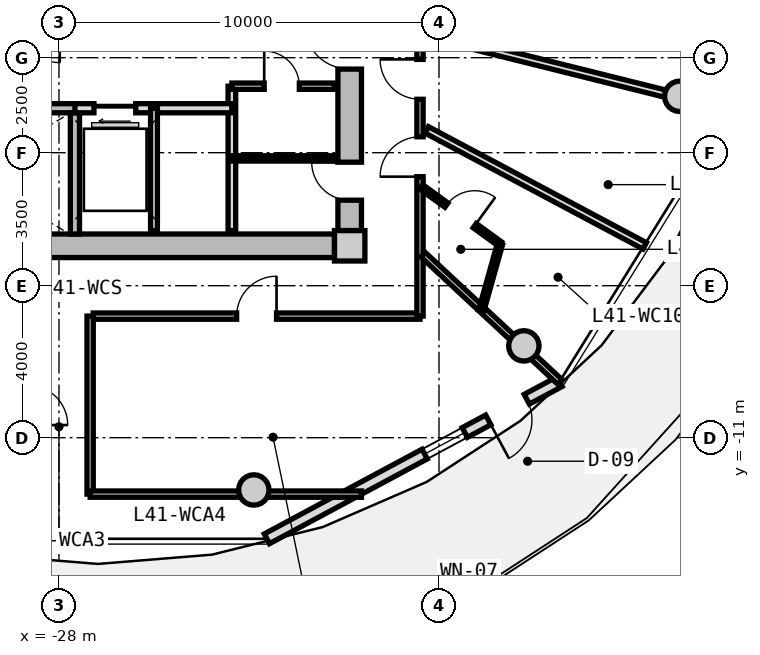
"""IFC4 building model, lengths in metres.
Left out: names, types, materials, properties, quantities, classifications, styles, units other than length and angle.
Written with IfcOpenShell. Run it as: python <this file> out.ifc"""

import sys

from ifc_helpers import new_model, si_unit, direction, frame, frame_2d, origin, origin_2d, place, context, subcontext, project, spatial, rectangle, circle, extrude, source, transform, mapped, element, fill, save


model = new_model("IFC4")
c1 = context("Model", 3, precision=1e-05, world=origin(), true_north=direction((0.0, 1.0)))
c2 = subcontext(c1, "Body", "Model", "MODEL_VIEW")
j1 = project(units=[si_unit("LENGTHUNIT", "METRE"), si_unit("PLANEANGLEUNIT", "RADIAN")], contexts=[c1])
p1 = place(None, origin())
s1 = spatial("IfcSite", under=j1, at=p1, CompositionType="ELEMENT")
p2 = place(p1, origin())
s2 = spatial("IfcBuilding", under=s1, at=p2, CompositionType="ELEMENT")
p3 = place(p2, frame((0.0, 0.0, 134.3)))
s3 = spatial("IfcBuildingStorey", under=s2, at=p3, CompositionType="ELEMENT", Elevation=134.3)
m1 = source(origin(), c2, "Body", "SweptSolid", [
    extrude(rectangle(XDim=0.8, YDim=0.8, at=origin_2d()), origin(), (0.0, 0.0, 1.0), 3.05),
])
p4 = place(p3, frame((-20.35, -5.95, 0.0), z_axis=(0.0, 0.0, 1.0), x_axis=(1.0, 0.0, 0.0)))
e1 = element("IfcColumn", 1, at=p4, inside=s3, PredefinedType="COLUMN", context=c2, shape_type="MappedRepresentation", body=[
    mapped(m1, transform((0.0, 0.0, 0.0), x_axis=(1.0, 0.0, 0.0), y_axis=(0.0, 1.0, 0.0), z_axis=(0.0, 0.0, 1.0), scale=1.0)),
])
m2 = source(origin(), c2, "Body", "SweptSolid", [
    extrude(rectangle(XDim=14.5, YDim=0.62, at=frame_2d((7.25, 0.0))), origin(), (0.0, 0.0, 1.0), 2.81),
])
p5 = place(p3, frame((-20.75, -5.95, 0.0), z_axis=(0.0, 0.0, 1.0), x_axis=(-1.0, 0.0, 0.0)))
e2 = element("IfcWall", 2, at=p5, inside=s3, PredefinedType="SHEAR", context=c2, shape_type="MappedRepresentation", body=[
    mapped(m2, transform((0.0, 0.0, 0.0), x_axis=(1.0, 0.0, 0.0), y_axis=(0.0, 1.0, 0.0), z_axis=(0.0, 0.0, 1.0), scale=1.0)),
])
m3 = source(origin(), c2, "Body", "SweptSolid", [
    extrude(rectangle(XDim=11.1, YDim=0.62, at=frame_2d((5.55, 0.0))), origin(), (0.0, 0.0, 1.0), 2.81),
])
p6 = place(p3, frame((-20.35, 5.55, 0.0), z_axis=(0.0, 0.0, 1.0), x_axis=(0.0, -1.0, 0.0)))
e3 = element("IfcWall", 3, at=p6, inside=s3, PredefinedType="SHEAR", context=c2, shape_type="MappedRepresentation", body=[
    mapped(m3, transform((0.0, 0.0, 0.0), x_axis=(1.0, 0.0, 0.0), y_axis=(0.0, 1.0, 0.0), z_axis=(0.0, 0.0, 1.0), scale=1.0)),
])
p7 = place(p6, frame((5.65, 0.0, 0.0)))
e4 = element("IfcOpeningElement", 4, at=p7, cuts=e3, PredefinedType="OPENING", context=c2, shape_type="SweptSolid", body=[
    extrude(rectangle(XDim=1.2, YDim=2.15, at=frame_2d((0.6, 1.075))), frame((0.0, 0.32, 0.0), z_axis=(0.0, -1.0, 0.0), x_axis=(1.0, 0.0, 0.0)), (0.0, 0.0, 1.0), 0.64),
])
p8 = place(p6, frame((9.3, 0.0, 0.0)))
e5 = element("IfcOpeningElement", 5, at=p8, cuts=e3, PredefinedType="OPENING", context=c2, shape_type="SweptSolid", body=[
    extrude(rectangle(XDim=1.0, YDim=2.1, at=frame_2d((0.5, 1.05))), frame((0.0, 0.32, 0.0), z_axis=(0.0, -1.0, 0.0), x_axis=(1.0, 0.0, 0.0)), (0.0, 0.0, 1.0), 0.64),
])
m4 = source(origin(), c2, "Body", "SweptSolid", [
    extrude(circle(Radius=0.4, at=origin_2d()), origin(), (0.0, 0.0, 1.0), 3.47),
])
for number, where, z_axis, x_axis in (
    (6, (-22.873, -12.375, -0.42), (0.0, 0.0, 1.0), (1.0, 0.0, 0.0)),
    (7, (-15.767, -8.584, -0.42), (0.0, 0.0, 1.0), (1.0, 0.0, 0.0)),
    (8, (-11.665, -2.016, -0.42), (0.0, 0.0, 1.0), (1.0, 0.0, 0.0)),
):
    element("IfcColumn", number, at=place(p3, frame(where, z_axis=z_axis, x_axis=x_axis)), inside=s3, PredefinedType="COLUMN", context=c2, shape_type="MappedRepresentation", body=[
        mapped(m4, transform((0.0, 0.0, 0.0), x_axis=(1.0, 0.0, 0.0), y_axis=(0.0, 1.0, 0.0), z_axis=(0.0, 0.0, 1.0), scale=1.0)),
    ])
m5 = source(origin(), c2, "Body", "SweptSolid", [
    extrude(rectangle(XDim=8.742, YDim=0.29, at=frame_2d((4.371, 0.0))), origin(), (0.0, 0.0, 1.0), 2.81),
])
p9 = place(p3, frame((-14.827, -9.524, 0.0), z_axis=(0.0, 0.0, 1.0), x_axis=(-0.880998740657, -0.473118609823, 0.0)))
e9 = element("IfcWall", 9, at=p9, inside=s3, PredefinedType="SOLIDWALL", context=c2, shape_type="MappedRepresentation", body=[
    mapped(m5, transform((0.0, 0.0, 0.0), x_axis=(1.0, 0.0, 0.0), y_axis=(0.0, 1.0, 0.0), z_axis=(0.0, 0.0, 1.0), scale=1.0)),
])
p10 = place(p9, frame((0.98, 0.0, 0.0)))
e10 = element("IfcOpeningElement", 10, at=p10, cuts=e9, PredefinedType="OPENING", context=c2, shape_type="SweptSolid", body=[
    extrude(rectangle(XDim=1.15, YDim=2.25, at=frame_2d((0.575, 1.125))), frame((0.0, 0.155, 0.0), z_axis=(0.0, -1.0, 0.0), x_axis=(1.0, 0.0, 0.0)), (0.0, 0.0, 1.0), 0.31),
])
p11 = place(p9, frame((2.83, 0.0, 0.85)))
e11 = element("IfcOpeningElement", 11, at=p11, cuts=e9, PredefinedType="OPENING", context=c2, shape_type="SweptSolid", body=[
    extrude(rectangle(XDim=1.2, YDim=1.5, at=frame_2d((0.6, 0.75))), frame((0.0, 0.155, 0.0), z_axis=(0.0, -1.0, 0.0), x_axis=(1.0, 0.0, 0.0)), (0.0, 0.0, 1.0), 0.31),
])
m6 = source(origin(), c2, "Body", "SweptSolid", [
    extrude(rectangle(XDim=7.88, YDim=0.24, at=frame_2d((3.94, 0.0))), origin(), (0.0, 0.0, 1.0), 2.81),
])
p12 = place(p3, frame((-35.34, -2.33, 0.0), z_axis=(0.0, 0.0, 1.0), x_axis=(1.0, 0.0, 0.0)))
e12 = element("IfcWall", 12, at=p12, inside=s3, PredefinedType="PARTITIONING", context=c2, shape_type="MappedRepresentation", body=[
    mapped(m6, transform((0.0, 0.0, 0.0), x_axis=(1.0, 0.0, 0.0), y_axis=(0.0, 1.0, 0.0), z_axis=(0.0, 0.0, 1.0), scale=1.0)),
])
p13 = place(p12, frame((1.0, 0.0, 0.0)))
e13 = element("IfcOpeningElement", 13, at=p13, cuts=e12, PredefinedType="OPENING", context=c2, shape_type="SweptSolid", body=[
    extrude(rectangle(XDim=1.1, YDim=2.15, at=frame_2d((0.55, 1.075))), frame((0.0, 0.13, 0.0), z_axis=(0.0, -1.0, 0.0), x_axis=(1.0, 0.0, 0.0)), (0.0, 0.0, 1.0), 0.26),
])
m7 = source(origin(), c2, "Body", "SweptSolid", [
    extrude(rectangle(XDim=3.19, YDim=0.24, at=frame_2d((1.595, 0.0))), origin(), (0.0, 0.0, 1.0), 2.81),
])
p14 = place(p3, frame((-27.58, -5.64, 0.0), z_axis=(0.0, 0.0, 1.0), x_axis=(0.0, 1.0, 0.0)))
e14 = element("IfcWall", 14, at=p14, inside=s3, PredefinedType="PARTITIONING", context=c2, shape_type="MappedRepresentation", body=[
    mapped(m7, transform((0.0, 0.0, 0.0), x_axis=(1.0, 0.0, 0.0), y_axis=(0.0, 1.0, 0.0), z_axis=(0.0, 0.0, 1.0), scale=1.0)),
])
m8 = source(origin(), c2, "Body", "SweptSolid", [
    extrude(rectangle(XDim=3.8, YDim=0.2, at=frame_2d((1.9, 0.0))), origin(), (0.0, 0.0, 1.0), 2.795),
])
p15 = place(p3, frame((-23.45, -5.55, 0.0), z_axis=(0.0, 0.0, 1.0), x_axis=(0.0, 1.0, 0.0)))
e15 = element("IfcWall", 15, at=p15, inside=s3, PredefinedType="PARTITIONING", context=c2, shape_type="MappedRepresentation", body=[
    mapped(m8, transform((0.0, 0.0, 0.0), x_axis=(1.0, 0.0, 0.0), y_axis=(0.0, 1.0, 0.0), z_axis=(0.0, 0.0, 1.0), scale=1.0)),
])
m9 = source(origin(), c2, "Body", "SweptSolid", [
    extrude(rectangle(XDim=4.13, YDim=0.24, at=frame_2d((2.065, 0.0))), origin(), (0.0, 0.0, 1.0), 2.795),
])
p16 = place(p3, frame((-27.58, -2.33, 0.0), z_axis=(0.0, 0.0, 1.0), x_axis=(1.0, 0.0, 0.0)))
e16 = element("IfcWall", 16, at=p16, inside=s3, PredefinedType="PARTITIONING", context=c2, shape_type="MappedRepresentation", body=[
    mapped(m9, transform((0.0, 0.0, 0.0), x_axis=(1.0, 0.0, 0.0), y_axis=(0.0, 1.0, 0.0), z_axis=(0.0, 0.0, 1.0), scale=1.0)),
])
p17 = place(p16, frame((0.5, 0.0, 0.0)))
e17 = element("IfcOpeningElement", 17, at=p17, cuts=e16, PredefinedType="OPENING", context=c2, shape_type="SweptSolid", body=[
    extrude(rectangle(XDim=1.1, YDim=2.2, at=frame_2d((0.55, 1.1))), frame((0.0, 0.13, 0.0), z_axis=(0.0, -1.0, 0.0), x_axis=(1.0, 0.0, 0.0)), (0.0, 0.0, 1.0), 0.26),
])
m10 = source(origin(), c2, "Body", "SweptSolid", [
    extrude(rectangle(XDim=3.22, YDim=0.18, at=frame_2d((1.61, 0.0))), origin(), (0.0, 0.0, 1.0), 2.795),
])
p18 = place(p3, frame((-25.5, -5.55, 0.0), z_axis=(0.0, 0.0, 1.0), x_axis=(0.0, 1.0, 0.0)))
e18 = element("IfcWall", 18, at=p18, inside=s3, PredefinedType="PARTITIONING", context=c2, shape_type="MappedRepresentation", body=[
    mapped(m10, transform((0.0, 0.0, 0.0), x_axis=(1.0, 0.0, 0.0), y_axis=(0.0, 1.0, 0.0), z_axis=(0.0, 0.0, 1.0), scale=1.0)),
])
m11 = source(origin(), c2, "Body", "SweptSolid", [
    extrude(rectangle(XDim=2.7, YDim=0.165, at=frame_2d((1.35, 0.0))), origin(), (0.0, 0.0, 1.0), 2.795),
])
p19 = place(p3, frame((-23.45, -1.75, 0.0), z_axis=(0.0, 0.0, 1.0), x_axis=(1.0, 0.0, 0.0)))
e19 = element("IfcWall", 19, at=p19, inside=s3, PredefinedType="PARTITIONING", context=c2, shape_type="MappedRepresentation", body=[
    mapped(m11, transform((0.0, 0.0, 0.0), x_axis=(1.0, 0.0, 0.0), y_axis=(0.0, 1.0, 0.0), z_axis=(0.0, 0.0, 1.0), scale=1.0)),
])
p20 = place(p19, frame((0.85, 0.0, 0.0)))
e20 = element("IfcOpeningElement", 20, at=p20, cuts=e19, PredefinedType="OPENING", context=c2, shape_type="SweptSolid", body=[
    extrude(rectangle(XDim=0.925, YDim=2.1, at=frame_2d((0.462, 1.05))), frame((0.0, 0.093, 0.0), z_axis=(0.0, -1.0, 0.0), x_axis=(1.0, 0.0, 0.0)), (0.0, 0.0, 1.0), 0.185),
])
m12 = source(origin(), c2, "Body", "SweptSolid", [
    extrude(rectangle(XDim=2.7, YDim=0.14, at=frame_2d((1.35, 0.0))), origin(), (0.0, 0.0, 1.0), 2.795),
])
p21 = place(p3, frame((-23.45, -3.65, 0.0), z_axis=(0.0, 0.0, 1.0), x_axis=(1.0, 0.0, 0.0)))
e21 = element("IfcWall", 21, at=p21, inside=s3, PredefinedType="PARTITIONING", context=c2, shape_type="MappedRepresentation", body=[
    mapped(m12, transform((0.0, 0.0, 0.0), x_axis=(1.0, 0.0, 0.0), y_axis=(0.0, 1.0, 0.0), z_axis=(0.0, 0.0, 1.0), scale=1.0)),
])
m13 = source(origin(), c2, "Body", "SweptSolid", [
    extrude(rectangle(XDim=8.6, YDim=0.165, at=frame_2d((4.3, 0.0))), origin(), (0.0, 0.0, 1.0), 2.795),
])
p22 = place(p3, frame((-18.5, -7.8, 0.0), z_axis=(0.0, 0.0, 1.0), x_axis=(-1.0, 0.0, 0.0)))
e22 = element("IfcWall", 22, at=p22, inside=s3, PredefinedType="PARTITIONING", context=c2, shape_type="MappedRepresentation", body=[
    mapped(m13, transform((0.0, 0.0, 0.0), x_axis=(1.0, 0.0, 0.0), y_axis=(0.0, 1.0, 0.0), z_axis=(0.0, 0.0, 1.0), scale=1.0)),
])
p23 = place(p22, frame((3.775, 0.0, 0.0)))
e23 = element("IfcOpeningElement", 23, at=p23, cuts=e22, PredefinedType="OPENING", context=c2, shape_type="SweptSolid", body=[
    extrude(rectangle(XDim=1.05, YDim=2.15, at=frame_2d((0.525, 1.075))), frame((0.0, 0.093, 0.0), z_axis=(0.0, -1.0, 0.0), x_axis=(1.0, 0.0, 0.0)), (0.0, 0.0, 1.0), 0.185),
])
m14 = source(origin(), c2, "Body", "SweptSolid", [
    extrude(rectangle(XDim=15.6, YDim=0.165, at=frame_2d((7.8, 0.0))), origin(), (0.0, 0.0, 1.0), 2.795),
])
p24 = place(p3, frame((-18.5, 7.8, 0.0), z_axis=(0.0, 0.0, 1.0), x_axis=(0.0, -1.0, 0.0)))
e24 = element("IfcWall", 24, at=p24, inside=s3, PredefinedType="PARTITIONING", context=c2, shape_type="MappedRepresentation", body=[
    mapped(m14, transform((0.0, 0.0, 0.0), x_axis=(1.0, 0.0, 0.0), y_axis=(0.0, 1.0, 0.0), z_axis=(0.0, 0.0, 1.0), scale=1.0)),
])
p25 = place(p24, frame((10.881, 0.0, 0.0)))
e25 = element("IfcOpeningElement", 25, at=p25, cuts=e24, PredefinedType="OPENING", context=c2, shape_type="SweptSolid", body=[
    extrude(rectangle(XDim=1.05, YDim=2.15, at=frame_2d((0.525, 1.075))), frame((0.0, 0.093, 0.0), z_axis=(0.0, -1.0, 0.0), x_axis=(1.0, 0.0, 0.0)), (0.0, 0.0, 1.0), 0.185),
])
p26 = place(p24, frame((8.844, 0.0, 0.0)))
e26 = element("IfcOpeningElement", 26, at=p26, cuts=e24, PredefinedType="OPENING", context=c2, shape_type="SweptSolid", body=[
    extrude(rectangle(XDim=1.05, YDim=2.15, at=frame_2d((0.525, 1.075))), frame((0.0, 0.093, 0.0), z_axis=(0.0, -1.0, 0.0), x_axis=(1.0, 0.0, 0.0)), (0.0, 0.0, 1.0), 0.185),
])
p27 = place(p24, frame((3.596, 0.0, 0.0)))
e27 = element("IfcOpeningElement", 27, at=p27, cuts=e24, PredefinedType="OPENING", context=c2, shape_type="SweptSolid", body=[
    extrude(rectangle(XDim=1.25, YDim=2.2, at=frame_2d((0.625, 1.1))), frame((0.0, 0.093, 0.0), z_axis=(0.0, -1.0, 0.0), x_axis=(1.0, 0.0, 0.0)), (0.0, 0.0, 1.0), 0.185),
])
m15 = source(origin(), c2, "Body", "SweptSolid", [
    extrude(rectangle(XDim=4.927, YDim=0.165, at=frame_2d((2.463, 0.0))), origin(), (0.0, 0.0, 1.0), 2.345),
])
p28 = place(p3, frame((-18.42, -6.183, 0.0), z_axis=(0.0, 0.0, 1.0), x_axis=(0.732191335987, -0.681098999783, 0.0)))
e28 = element("IfcWall", 28, at=p28, inside=s3, PredefinedType="PARTITIONING", context=c2, shape_type="MappedRepresentation", body=[
    mapped(m15, transform((0.0, 0.0, 0.0), x_axis=(1.0, 0.0, 0.0), y_axis=(0.0, 1.0, 0.0), z_axis=(0.0, 0.0, 1.0), scale=1.0)),
])
m16 = source(origin(), c2, "Body", "SweptSolid", [
    extrude(rectangle(XDim=4.685, YDim=0.165, at=frame_2d((2.342, 0.0))), origin(), (0.0, 0.0, 1.0), 2.795),
])
p29 = place(p3, frame((-27.18, -12.485, 0.0), z_axis=(0.0, 0.0, 1.0), x_axis=(0.0, 1.0, 0.0)))
e29 = element("IfcWall", 29, at=p29, inside=s3, PredefinedType="PARTITIONING", context=c2, shape_type="MappedRepresentation", body=[
    mapped(m16, transform((0.0, 0.0, 0.0), x_axis=(1.0, 0.0, 0.0), y_axis=(0.0, 1.0, 0.0), z_axis=(0.0, 0.0, 1.0), scale=1.0)),
])
m17 = source(origin(), c2, "Body", "SweptSolid", [
    extrude(rectangle(XDim=7.139, YDim=0.165, at=frame_2d((3.569, 0.0))), origin(), (0.0, 0.0, 1.0), 2.345),
])
p30 = place(p3, frame((-27.18, -12.485, 0.0), z_axis=(0.0, 0.0, 1.0), x_axis=(1.0, 0.0, 0.0)))
e30 = element("IfcWall", 30, at=p30, inside=s3, PredefinedType="PARTITIONING", context=c2, shape_type="MappedRepresentation", body=[
    mapped(m17, transform((0.0, 0.0, 0.0), x_axis=(1.0, 0.0, 0.0), y_axis=(0.0, 1.0, 0.0), z_axis=(0.0, 0.0, 1.0), scale=1.0)),
])
m18 = source(origin(), c2, "Body", "SweptSolid", [
    extrude(rectangle(XDim=8.305, YDim=0.19, at=frame_2d((4.153, 0.0))), origin(), (0.0, 0.0, 1.0), 2.345),
])
p31 = place(p3, frame((-18.42, -0.357, 0.0), z_axis=(0.0, 0.0, 1.0), x_axis=(0.970309994378, -0.241864662175, 0.0)))
e31 = element("IfcWall", 31, at=p31, inside=s3, PredefinedType="PARTITIONING", context=c2, shape_type="MappedRepresentation", body=[
    mapped(m18, transform((0.0, 0.0, 0.0), x_axis=(1.0, 0.0, 0.0), y_axis=(0.0, 1.0, 0.0), z_axis=(0.0, 0.0, 1.0), scale=1.0)),
])
m19 = source(origin(), c2, "Body", "SweptSolid", [
    extrude(rectangle(XDim=6.499, YDim=0.19, at=frame_2d((3.25, 0.0))), origin(), (0.0, 0.0, 1.0), 2.795),
])
p32 = place(p3, frame((-18.324, -2.898, 0.0), z_axis=(0.0, 0.0, 1.0), x_axis=(0.882700013711, -0.469936895545, 0.0)))
e32 = element("IfcWall", 32, at=p32, inside=s3, PredefinedType="PARTITIONING", context=c2, shape_type="MappedRepresentation", body=[
    mapped(m19, transform((0.0, 0.0, 0.0), x_axis=(1.0, 0.0, 0.0), y_axis=(0.0, 1.0, 0.0), z_axis=(0.0, 0.0, 1.0), scale=1.0)),
])
m20 = source(origin(), c2, "Body", "SweptSolid", [
    extrude(rectangle(XDim=2.563, YDim=0.14, at=frame_2d((1.282, 0.0))), origin(), (0.0, 0.0, 1.0), 2.795),
])
p33 = place(p3, frame((-18.47, -4.397, 0.0), z_axis=(0.0, 0.0, 1.0), x_axis=(0.809308208957, -0.587384220859, 0.0)))
e33 = element("IfcWall", 33, at=p33, inside=s3, PredefinedType="PARTITIONING", context=c2, shape_type="MappedRepresentation", body=[
    mapped(m20, transform((0.0, 0.0, 0.0), x_axis=(1.0, 0.0, 0.0), y_axis=(0.0, 1.0, 0.0), z_axis=(0.0, 0.0, 1.0), scale=1.0)),
])
p34 = place(p33, frame((0.822, 0.0, 0.0)))
e34 = element("IfcOpeningElement", 34, at=p34, cuts=e33, PredefinedType="OPENING", context=c2, shape_type="SweptSolid", body=[
    extrude(rectangle(XDim=0.92, YDim=2.1, at=frame_2d((0.46, 1.05))), frame((0.0, 0.08, 0.0), z_axis=(0.0, -1.0, 0.0), x_axis=(1.0, 0.0, 0.0)), (0.0, 0.0, 1.0), 0.16),
])
m21 = source(origin(), c2, "Body", "SweptSolid", [
    extrude(rectangle(XDim=1.826, YDim=0.14, at=frame_2d((0.913, 0.0))), origin(), (0.0, 0.0, 1.0), 2.435),
])
p35 = place(p3, frame((-16.396, -5.903, 0.0), z_axis=(0.0, 0.0, 1.0), x_axis=(-0.270745576918, -0.962650940154, 0.0)))
e35 = element("IfcWall", 35, at=p35, inside=s3, PredefinedType="PARTITIONING", context=c2, shape_type="MappedRepresentation", body=[
    mapped(m21, transform((0.0, 0.0, 0.0), x_axis=(1.0, 0.0, 0.0), y_axis=(0.0, 1.0, 0.0), z_axis=(0.0, 0.0, 1.0), scale=1.0)),
])
m22 = source(origin(), c2, "Body", "SweptSolid", [
    extrude(rectangle(XDim=1.15, YDim=2.25, at=frame_2d((0.575, 1.125))), frame((0.0, 0.025, 0.0), z_axis=(0.0, -1.0, 0.0), x_axis=(1.0, 0.0, 0.0)), (0.0, 0.0, 1.0), 0.05),
])
p36 = place(p10, origin())
e36 = element("IfcDoor", 36, at=p36, inside=s3, OperationType="SINGLE_SWING_RIGHT", PredefinedType="DOOR", context=c2, shape_type="MappedRepresentation", body=[
    mapped(m22, transform((0.0, 0.0, 0.0), x_axis=(1.0, 0.0, 0.0), y_axis=(0.0, 1.0, 0.0), z_axis=(0.0, 0.0, 1.0), scale=1.0)),
])
fill(e10, e36)
m23 = source(origin(), c2, "Body", "SweptSolid", [
    extrude(rectangle(XDim=1.2, YDim=1.5, at=frame_2d((0.6, 0.75))), frame((0.0, 0.03, 0.0), z_axis=(0.0, -1.0, 0.0), x_axis=(1.0, 0.0, 0.0)), (0.0, 0.0, 1.0), 0.06),
])
p37 = place(p11, origin())
e37 = element("IfcWindow", 37, at=p37, inside=s3, PartitioningType="SINGLE_PANEL", PredefinedType="WINDOW", context=c2, shape_type="MappedRepresentation", body=[
    mapped(m23, transform((0.0, 0.0, 0.0), x_axis=(1.0, 0.0, 0.0), y_axis=(0.0, 1.0, 0.0), z_axis=(0.0, 0.0, 1.0), scale=1.0)),
])
fill(e11, e37)
m24 = source(origin(), c2, "Body", "SweptSolid", [
    extrude(rectangle(XDim=1.2, YDim=2.15, at=frame_2d((0.6, 1.075))), frame((0.0, 0.025, 0.0), z_axis=(0.0, -1.0, 0.0), x_axis=(1.0, 0.0, 0.0)), (0.0, 0.0, 1.0), 0.05),
])
p38 = place(p7, frame((1.2, 0.0, 0.0), z_axis=(0.0, 0.0, 1.0), x_axis=(-1.0, 0.0, 0.0)))
e38 = element("IfcDoor", 38, at=p38, inside=s3, OperationType="SINGLE_SWING_RIGHT", PredefinedType="DOOR", context=c2, shape_type="MappedRepresentation", body=[
    mapped(m24, transform((0.0, 0.0, 0.0), x_axis=(1.0, 0.0, 0.0), y_axis=(0.0, 1.0, 0.0), z_axis=(0.0, 0.0, 1.0), scale=1.0)),
])
fill(e4, e38)
m25 = source(origin(), c2, "Body", "SweptSolid", [
    extrude(rectangle(XDim=1.1, YDim=2.2, at=frame_2d((0.55, 1.1))), frame((0.0, 0.025, 0.0), z_axis=(0.0, -1.0, 0.0), x_axis=(1.0, 0.0, 0.0)), (0.0, 0.0, 1.0), 0.05),
])
p39 = place(p17, frame((1.1, 0.0, 0.0), z_axis=(0.0, 0.0, 1.0), x_axis=(-1.0, 0.0, 0.0)))
e39 = element("IfcDoor", 39, at=p39, inside=s3, OperationType="SLIDING_TO_LEFT", PredefinedType="DOOR", context=c2, shape_type="MappedRepresentation", body=[
    mapped(m25, transform((0.0, 0.0, 0.0), x_axis=(1.0, 0.0, 0.0), y_axis=(0.0, 1.0, 0.0), z_axis=(0.0, 0.0, 1.0), scale=1.0)),
])
fill(e17, e39)
m26 = source(origin(), c2, "Body", "SweptSolid", [
    extrude(rectangle(XDim=0.925, YDim=2.1, at=frame_2d((0.462, 1.05))), frame((0.0, 0.025, 0.0), z_axis=(0.0, -1.0, 0.0), x_axis=(1.0, 0.0, 0.0)), (0.0, 0.0, 1.0), 0.05),
])
p40 = place(p20, origin())
e40 = element("IfcDoor", 40, at=p40, inside=s3, OperationType="SINGLE_SWING_LEFT", PredefinedType="DOOR", context=c2, shape_type="MappedRepresentation", body=[
    mapped(m26, transform((0.0, 0.0, 0.0), x_axis=(1.0, 0.0, 0.0), y_axis=(0.0, 1.0, 0.0), z_axis=(0.0, 0.0, 1.0), scale=1.0)),
])
fill(e20, e40)
m27 = source(origin(), c2, "Body", "SweptSolid", [
    extrude(rectangle(XDim=1.0, YDim=2.1, at=frame_2d((0.5, 1.05))), frame((0.0, 0.025, 0.0), z_axis=(0.0, -1.0, 0.0), x_axis=(1.0, 0.0, 0.0)), (0.0, 0.0, 1.0), 0.05),
])
p41 = place(p8, frame((1.0, 0.0, 0.0), z_axis=(0.0, 0.0, 1.0), x_axis=(-1.0, 0.0, 0.0)))
e41 = element("IfcDoor", 41, at=p41, inside=s3, OperationType="SINGLE_SWING_RIGHT", PredefinedType="DOOR", context=c2, shape_type="MappedRepresentation", body=[
    mapped(m27, transform((0.0, 0.0, 0.0), x_axis=(1.0, 0.0, 0.0), y_axis=(0.0, 1.0, 0.0), z_axis=(0.0, 0.0, 1.0), scale=1.0)),
])
fill(e5, e41)
m28 = source(origin(), c2, "Body", "SweptSolid", [
    extrude(rectangle(XDim=1.05, YDim=2.15, at=frame_2d((0.525, 1.075))), frame((0.0, 0.025, 0.0), z_axis=(0.0, -1.0, 0.0), x_axis=(1.0, 0.0, 0.0)), (0.0, 0.0, 1.0), 0.05),
])
p42 = place(p23, frame((1.05, 0.0, 0.0), z_axis=(0.0, 0.0, 1.0), x_axis=(-1.0, 0.0, 0.0)))
e42 = element("IfcDoor", 42, at=p42, inside=s3, OperationType="SINGLE_SWING_RIGHT", PredefinedType="DOOR", context=c2, shape_type="MappedRepresentation", body=[
    mapped(m28, transform((0.0, 0.0, 0.0), x_axis=(1.0, 0.0, 0.0), y_axis=(0.0, 1.0, 0.0), z_axis=(0.0, 0.0, 1.0), scale=1.0)),
])
fill(e23, e42)
p43 = place(p25, frame((1.05, 0.0, 0.0), z_axis=(0.0, 0.0, 1.0), x_axis=(-1.0, 0.0, 0.0)))
e43 = element("IfcDoor", 43, at=p43, inside=s3, OperationType="SINGLE_SWING_LEFT", PredefinedType="DOOR", context=c2, shape_type="MappedRepresentation", body=[
    mapped(m28, transform((0.0, 0.0, 0.0), x_axis=(1.0, 0.0, 0.0), y_axis=(0.0, 1.0, 0.0), z_axis=(0.0, 0.0, 1.0), scale=1.0)),
])
fill(e25, e43)
m29 = source(origin(), c2, "Body", "SweptSolid", [
    extrude(rectangle(XDim=0.92, YDim=2.1, at=frame_2d((0.46, 1.05))), frame((0.0, 0.025, 0.0), z_axis=(0.0, -1.0, 0.0), x_axis=(1.0, 0.0, 0.0)), (0.0, 0.0, 1.0), 0.05),
])
p44 = place(p34, origin())
e44 = element("IfcDoor", 44, at=p44, inside=s3, OperationType="SINGLE_SWING_RIGHT", PredefinedType="DOOR", context=c2, shape_type="MappedRepresentation", body=[
    mapped(m29, transform((0.0, 0.0, 0.0), x_axis=(1.0, 0.0, 0.0), y_axis=(0.0, 1.0, 0.0), z_axis=(0.0, 0.0, 1.0), scale=1.0)),
])
fill(e34, e44)
p45 = place(p26, frame((1.05, 0.0, 0.0), z_axis=(0.0, 0.0, 1.0), x_axis=(-1.0, 0.0, 0.0)))
e45 = element("IfcDoor", 45, at=p45, inside=s3, OperationType="SINGLE_SWING_RIGHT", PredefinedType="DOOR", context=c2, shape_type="MappedRepresentation", body=[
    mapped(m28, transform((0.0, 0.0, 0.0), x_axis=(1.0, 0.0, 0.0), y_axis=(0.0, 1.0, 0.0), z_axis=(0.0, 0.0, 1.0), scale=1.0)),
])
fill(e26, e45)
save(model, sys.argv[1])
